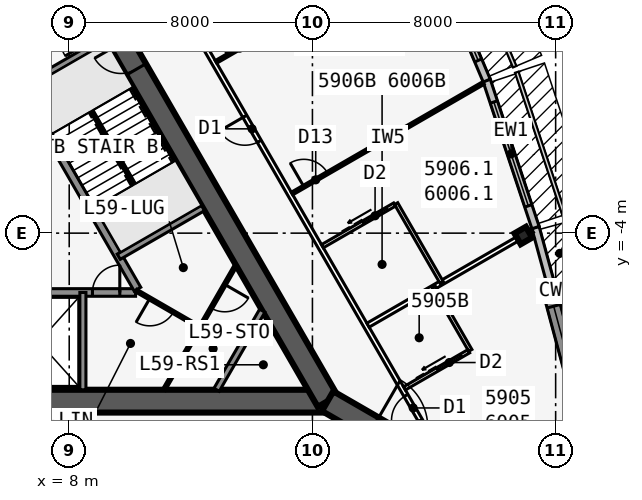
"""IFC4 building model, lengths in metres.
Left out: names, types, materials, properties, quantities, classifications, styles, units other than length and angle.
Written with IfcOpenShell. Run it as: python <this file> out.ifc"""

import sys

from ifc_helpers import new_model, si_unit, direction, frame, frame_2d, origin, origin_2d, place, context, subcontext, project, spatial, polyline, rectangle, i_section, outline, extrude, element, fill, save


model = new_model("IFC4")
c1 = context("Model", 3, precision=1e-05, world=origin(), true_north=direction((0.0, 1.0)))
c2 = subcontext(c1, "Body", "Model", "MODEL_VIEW")
j1 = project(units=[si_unit("LENGTHUNIT", "METRE"), si_unit("PLANEANGLEUNIT", "RADIAN")], contexts=[c1])
p1 = place(None, origin())
s1 = spatial("IfcSite", under=j1, at=p1, CompositionType="ELEMENT")
p2 = place(p1, origin())
s2 = spatial("IfcBuilding", under=s1, at=p2, CompositionType="ELEMENT")
p3 = place(p2, frame((0.0, 0.0, 222.5)))
s3 = spatial("IfcBuildingStorey", under=s2, at=p3, CompositionType="ELEMENT", Elevation=222.5)
p4 = place(p3, frame((-16.5, -9.526, 0.0), z_axis=(0.0, 0.0, 1.0), x_axis=(1.0, 0.0, 0.0)))
e1 = element("IfcWall", 1, at=p4, inside=s3, PredefinedType="SHEAR", context=c2, shape_type="SweptSolid", body=[
    extrude(rectangle(XDim=33.0, YDim=0.75, at=frame_2d((16.5, 0.0))), origin(), (0.0, 0.0, 1.0), 3.6),
])
p5 = place(p4, frame((14.05, 0.0, 0.0)))
e2 = element("IfcOpeningElement", 2, at=p5, cuts=e1, PredefinedType="OPENING", context=c2, shape_type="SweptSolid", body=[
    extrude(rectangle(XDim=1.8, YDim=2.13, at=frame_2d((0.9, 1.065))), frame((0.0, 0.385, 0.0), z_axis=(0.0, -1.0, 0.0), x_axis=(1.0, 0.0, 0.0)), (0.0, 0.0, 1.0), 0.77),
])
p6 = place(p3, frame((-0.55, -5.951, 0.0), z_axis=(0.0, 0.0, 1.0), x_axis=(1.0, 0.0, 0.0)))
e3 = element("IfcWall", 3, at=p6, inside=s3, PredefinedType="SOLIDWALL", context=c2, shape_type="SweptSolid", body=[
    extrude(rectangle(XDim=10.733, YDim=0.25, at=frame_2d((5.366, 0.0))), origin(), (0.0, 0.0, 1.0), 3.435),
])
p7 = place(p6, frame((9.314, 0.0, 0.0)))
e4 = element("IfcOpeningElement", 4, at=p7, cuts=e3, PredefinedType="OPENING", context=c2, shape_type="SweptSolid", body=[
    extrude(rectangle(XDim=0.9, YDim=2.13, at=frame_2d((0.45, 1.065))), frame((0.0, 0.135, 0.0), z_axis=(0.0, -1.0, 0.0), x_axis=(1.0, 0.0, 0.0)), (0.0, 0.0, 1.0), 0.27),
])
p8 = place(p6, frame((1.05, 0.0, 0.0)))
e5 = element("IfcOpeningElement", 5, at=p8, cuts=e3, PredefinedType="OPENING", context=c2, shape_type="SweptSolid", body=[
    extrude(rectangle(XDim=1.1, YDim=2.13, at=frame_2d((0.55, 1.065))), frame((0.0, 0.135, 0.0), z_axis=(0.0, -1.0, 0.0), x_axis=(1.0, 0.0, 0.0)), (0.0, 0.0, 1.0), 0.27),
])
p9 = place(p6, frame((4.05, 0.0, 0.0)))
e6 = element("IfcOpeningElement", 6, at=p9, cuts=e3, PredefinedType="OPENING", context=c2, shape_type="SweptSolid", body=[
    extrude(rectangle(XDim=1.1, YDim=2.13, at=frame_2d((0.55, 1.065))), frame((0.0, 0.135, 0.0), z_axis=(0.0, -1.0, 0.0), x_axis=(1.0, 0.0, 0.0)), (0.0, 0.0, 1.0), 0.27),
])
p10 = place(p3, frame((8.45, -5.951, 0.0), z_axis=(0.0, 0.0, 1.0), x_axis=(0.0, -1.0, 0.0)))
e7 = element("IfcWall", 7, at=p10, inside=s3, PredefinedType="SOLIDWALL", context=c2, shape_type="SweptSolid", body=[
    extrude(rectangle(XDim=3.2, YDim=0.2, at=frame_2d((1.6, 0.0))), origin(), (0.0, 0.0, 1.0), 3.435),
])
p11 = place(p3, frame((16.5, -9.526, 0.0), z_axis=(0.0, 0.0, 1.0), x_axis=(-0.499999749417, 0.866025548458, 0.0)))
e8 = element("IfcWall", 8, at=p11, inside=s3, PredefinedType="SHEAR", context=c2, shape_type="SweptSolid", body=[
    extrude(rectangle(XDim=33.0, YDim=0.75, at=frame_2d((16.5, 0.0))), origin(), (0.0, 0.0, 1.0), 3.6),
])
p12 = place(p11, frame((14.15, 0.0, 0.0)))
e9 = element("IfcOpeningElement", 9, at=p12, cuts=e8, PredefinedType="OPENING", context=c2, shape_type="SweptSolid", body=[
    extrude(rectangle(XDim=1.8, YDim=2.13, at=frame_2d((0.9, 1.065))), frame((0.0, 0.385, 0.0), z_axis=(0.0, -1.0, 0.0), x_axis=(1.0, 0.0, 0.0)), (0.0, 0.0, 1.0), 0.77),
])
p13 = place(p11, frame((12.6, 0.0, 0.0)))
e10 = element("IfcOpeningElement", 10, at=p13, cuts=e8, PredefinedType="OPENING", context=c2, shape_type="SweptSolid", body=[
    extrude(rectangle(XDim=1.0, YDim=2.13, at=frame_2d((0.5, 1.065))), frame((0.0, 0.385, 0.0), z_axis=(0.0, -1.0, 0.0), x_axis=(1.0, 0.0, 0.0)), (0.0, 0.0, 1.0), 0.77),
])
p14 = place(p3, frame((10.245, -5.843, 0.0), z_axis=(0.0, 0.0, 1.0), x_axis=(-0.499993009313, 0.866029439822, 0.0)))
e11 = element("IfcWall", 11, at=p14, inside=s3, PredefinedType="SOLIDWALL", context=c2, shape_type="SweptSolid", body=[
    extrude(rectangle(XDim=7.733, YDim=0.25, at=frame_2d((3.866, 0.0))), origin(), (0.0, 0.0, 1.0), 3.435),
])
for number, where, z_axis, x_axis in (
    (12, (9.629, -4.775, 0.0), (0.0, 0.0, 1.0), (0.866, 0.5, 0.0)),
    (13, (6.429, 0.767, 0.0), (0.0, 0.0, 1.0), (0.866, 0.5, 0.0)),
):
    element("IfcWall", number, at=place(p3, frame(where, z_axis=z_axis, x_axis=x_axis)), inside=s3, PredefinedType="SOLIDWALL", context=c2, shape_type="SweptSolid", body=[
        extrude(rectangle(XDim=3.2, YDim=0.2, at=frame_2d((1.6, 0.0))), origin(), (0.0, 0.0, 1.0), 3.435),
    ])
p15 = place(p3, frame((16.5, -9.526, 0.0), z_axis=(0.0, 0.0, 1.0), x_axis=(0.866031398331, -0.499989616998, 0.0)))
e14 = element("IfcWall", 14, at=p15, inside=s3, PredefinedType="SHEAR", context=c2, shape_type="SweptSolid", body=[
    extrude(rectangle(XDim=4.746, YDim=0.75, at=frame_2d((2.373, 0.0))), origin(), (0.0, 0.0, 1.0), 3.6),
])
p16 = place(p15, frame((1.725, 0.0, 0.0)))
e15 = element("IfcOpeningElement", 15, at=p16, cuts=e14, PredefinedType="OPENING", context=c2, shape_type="SweptSolid", body=[
    extrude(rectangle(XDim=1.8, YDim=2.13, at=frame_2d((0.9, 1.065))), frame((0.0, 0.385, 0.0), z_axis=(0.0, -1.0, 0.0), x_axis=(1.0, 0.0, 0.0)), (0.0, 0.0, 1.0), 0.77),
])
p17 = place(p3, frame((22.937, -4.078, 0.0), z_axis=(0.0, 0.0, 1.0), x_axis=(-0.5, 0.866025403784, 0.0)))
e16 = element("IfcColumn", 16, at=p17, inside=s3, PredefinedType="COLUMN", context=c2, shape_type="SweptSolid", body=[
    extrude(i_section(OverallWidth=0.411, OverallDepth=0.434, WebThickness=0.036, FlangeThickness=0.057, at=origin_2d()), origin(), (0.0, 0.0, 1.0), 3.6),
])
p18 = place(p3, frame((23.783, -13.798, 0.0), z_axis=(0.0, 0.0, 1.0), x_axis=(0.258799282522, 0.96593112144, 0.0)))
e17 = element("IfcWall", 17, at=p18, inside=s3, PredefinedType="SOLIDWALL", context=c2, shape_type="SweptSolid", body=[
    extrude(outline(polyline([(4.184, 0.225), (0.509, 0.225), (0.479, 0.113), (0.059, 0.225), (0.0, 0.225), (0.0, -0.225), (4.184, -0.225), (4.184, 0.225)])), origin(), (0.0, 0.0, 1.0), 3.435),
])
p19 = place(p18, frame((1.071, 0.0, 0.45)))
e18 = element("IfcOpeningElement", 18, at=p19, cuts=e17, PredefinedType="OPENING", context=c2, shape_type="SweptSolid", body=[
    extrude(rectangle(XDim=2.4, YDim=2.6, at=frame_2d((1.2, 1.3))), frame((0.0, 0.235, 0.0), z_axis=(0.0, -1.0, 0.0), x_axis=(1.0, 0.0, 0.0)), (0.0, 0.0, 1.0), 0.47),
])
p20 = place(p3, frame((24.865, -9.873, 0.0), z_axis=(0.0, 0.0, 1.0), x_axis=(-0.258784695888, 0.965935029479, 0.0)))
e19 = element("IfcWall", 19, at=p20, inside=s3, PredefinedType="SOLIDWALL", context=c2, shape_type="SweptSolid", body=[
    extrude(rectangle(XDim=4.184, YDim=0.45, at=frame_2d((2.092, 0.0))), origin(), (0.0, 0.0, 1.0), 3.435),
])
p21 = place(p20, frame((0.592, 0.0, 0.45)))
e20 = element("IfcOpeningElement", 20, at=p21, cuts=e19, PredefinedType="OPENING", context=c2, shape_type="SweptSolid", body=[
    extrude(rectangle(XDim=3.0, YDim=2.6, at=frame_2d((1.5, 1.3))), frame((0.0, 0.235, 0.0), z_axis=(0.0, -1.0, 0.0), x_axis=(1.0, 0.0, 0.0)), (0.0, 0.0, 1.0), 0.47),
])
p22 = place(p3, frame((23.879, -5.806, 0.0), z_axis=(0.0, 0.0, 1.0), x_axis=(-0.262867703986, 0.964831887015, 0.0)))
e21 = element("IfcWall", 21, at=p22, inside=s3, PredefinedType="STANDARD", context=c2, shape_type="SweptSolid", body=[
    extrude(rectangle(XDim=2.068, YDim=0.25, at=frame_2d((1.034, 0.0))), origin(), (0.0, 0.0, 1.0), 3.435),
])
p23 = place(p3, frame((23.338, -3.817, 0.0), z_axis=(0.0, 0.0, 1.0), x_axis=(-0.315108478109, 0.949055660656, 0.0)))
e22 = element("IfcWall", 22, at=p23, inside=s3, PredefinedType="STANDARD", context=c2, shape_type="SweptSolid", body=[
    extrude(rectangle(XDim=5.105, YDim=0.25, at=frame_2d((2.552, 0.0))), origin(), (0.0, 0.0, 1.0), 3.435),
])
p24 = place(p23, frame((0.752, 0.0, 0.45)))
e23 = element("IfcOpeningElement", 23, at=p24, cuts=e22, PredefinedType="OPENING", context=c2, shape_type="SweptSolid", body=[
    extrude(rectangle(XDim=3.6, YDim=2.6, at=frame_2d((1.8, 1.3))), frame((0.0, 0.135, 0.0), z_axis=(0.0, -1.0, 0.0), x_axis=(1.0, 0.0, 0.0)), (0.0, 0.0, 1.0), 0.27),
])
p25 = place(p3, frame((21.733, 1.018, 0.0), z_axis=(0.0, 0.0, 1.0), x_axis=(-0.390096809471, 0.920773848044, 0.0)))
e24 = element("IfcWall", 24, at=p25, inside=s3, PredefinedType="STANDARD", context=c2, shape_type="SweptSolid", body=[
    extrude(rectangle(XDim=5.038, YDim=0.25, at=frame_2d((2.519, 0.0))), origin(), (0.0, 0.0, 1.0), 3.435),
])
p26 = place(p25, frame((0.719, 0.0, 0.45)))
e25 = element("IfcOpeningElement", 25, at=p26, cuts=e24, PredefinedType="OPENING", context=c2, shape_type="SweptSolid", body=[
    extrude(rectangle(XDim=3.6, YDim=2.6, at=frame_2d((1.8, 1.3))), frame((0.0, 0.135, 0.0), z_axis=(0.0, -1.0, 0.0), x_axis=(1.0, 0.0, 0.0)), (0.0, 0.0, 1.0), 0.27),
])
p27 = place(p3, frame((20.102, -11.115, 0.0), z_axis=(0.0, 0.0, 1.0), x_axis=(-0.500000265775, 0.866025250339, 0.0)))
e26 = element("IfcWall", 26, at=p27, inside=s3, PredefinedType="PARTITIONING", context=c2, shape_type="SweptSolid", body=[
    extrude(rectangle(XDim=39.354, YDim=0.15, at=frame_2d((19.677, 0.0))), origin(), (0.0, 0.0, 1.0), 3.435),
])
p28 = place(p27, frame((1.102, 0.0, 0.0)))
e27 = element("IfcOpeningElement", 27, at=p28, cuts=e26, PredefinedType="OPENING", context=c2, shape_type="SweptSolid", body=[
    extrude(rectangle(XDim=0.95, YDim=2.13, at=frame_2d((0.475, 1.065))), frame((0.0, 0.085, 0.0), z_axis=(0.0, -1.0, 0.0), x_axis=(1.0, 0.0, 0.0)), (0.0, 0.0, 1.0), 0.17),
])
p29 = place(p27, frame((11.702, 0.0, 0.0)))
e28 = element("IfcOpeningElement", 28, at=p29, cuts=e26, PredefinedType="OPENING", context=c2, shape_type="SweptSolid", body=[
    extrude(rectangle(XDim=0.95, YDim=2.13, at=frame_2d((0.475, 1.065))), frame((0.0, 0.085, 0.0), z_axis=(0.0, -1.0, 0.0), x_axis=(1.0, 0.0, 0.0)), (0.0, 0.0, 1.0), 0.17),
])
p30 = place(p27, frame((26.702, 0.0, 0.0)))
e29 = element("IfcOpeningElement", 29, at=p30, cuts=e26, PredefinedType="OPENING", context=c2, shape_type="SweptSolid", body=[
    extrude(rectangle(XDim=0.95, YDim=2.13, at=frame_2d((0.475, 1.065))), frame((0.0, 0.085, 0.0), z_axis=(0.0, -1.0, 0.0), x_axis=(1.0, 0.0, 0.0)), (0.0, 0.0, 1.0), 0.17),
])
p31 = place(p27, frame((37.302, 0.0, 0.0)))
e30 = element("IfcOpeningElement", 30, at=p31, cuts=e26, PredefinedType="OPENING", context=c2, shape_type="SweptSolid", body=[
    extrude(rectangle(XDim=0.95, YDim=2.13, at=frame_2d((0.475, 1.065))), frame((0.0, 0.085, 0.0), z_axis=(0.0, -1.0, 0.0), x_axis=(1.0, 0.0, 0.0)), (0.0, 0.0, 1.0), 0.17),
])
p32 = place(p3, frame((17.829, -7.027, 0.0), z_axis=(0.0, 0.0, 1.0), x_axis=(0.866026604282, 0.499997920671, 0.0)))
e31 = element("IfcWall", 31, at=p32, inside=s3, PredefinedType="PARTITIONING", context=c2, shape_type="SweptSolid", body=[
    extrude(rectangle(XDim=6.24, YDim=0.15, at=frame_2d((3.12, 0.0))), origin(), (0.0, 0.0, 1.0), 2.589),
])
p33 = place(p3, frame((15.329, -2.697, 0.0), z_axis=(0.0, 0.0, 1.0), x_axis=(0.866032413668, 0.499987858329, 0.0)))
e32 = element("IfcWall", 32, at=p33, inside=s3, PredefinedType="PARTITIONING", context=c2, shape_type="SweptSolid", body=[
    extrude(rectangle(XDim=7.273, YDim=0.1, at=frame_2d((3.636, 0.0))), origin(), (0.0, 0.0, 1.0), 2.589),
])
p34 = place(p33, frame((0.45, 0.0, 0.0)))
e33 = element("IfcOpeningElement", 33, at=p34, cuts=e32, PredefinedType="OPENING", context=c2, shape_type="SweptSolid", body=[
    extrude(rectangle(XDim=0.9, YDim=2.13, at=frame_2d((0.45, 1.065))), frame((0.0, 0.06, 0.0), z_axis=(0.0, -1.0, 0.0), x_axis=(1.0, 0.0, 0.0)), (0.0, 0.0, 1.0), 0.12),
])
p35 = place(p3, frame((12.829, 1.633, 0.0), z_axis=(0.0, 0.0, 1.0), x_axis=(0.866030558329, 0.49999107196, 0.0)))
e34 = element("IfcWall", 34, at=p35, inside=s3, PredefinedType="PARTITIONING", context=c2, shape_type="SweptSolid", body=[
    extrude(rectangle(XDim=7.894, YDim=0.1, at=frame_2d((3.947, 0.0))), origin(), (0.0, 0.0, 1.0), 2.589),
])
p36 = place(p35, frame((0.45, 0.0, 0.0)))
e35 = element("IfcOpeningElement", 35, at=p36, cuts=e34, PredefinedType="OPENING", context=c2, shape_type="SweptSolid", body=[
    extrude(rectangle(XDim=0.9, YDim=2.13, at=frame_2d((0.45, 1.065))), frame((0.0, 0.06, 0.0), z_axis=(0.0, -1.0, 0.0), x_axis=(1.0, 0.0, 0.0)), (0.0, 0.0, 1.0), 0.12),
])
p37 = place(p3, frame((21.194, -7.856, 0.0), z_axis=(0.0, 0.0, 1.0), x_axis=(-0.500033551112, 0.866006032174, 0.0)))
e36 = element("IfcWall", 36, at=p37, inside=s3, PredefinedType="PLUMBINGWALL", context=c2, shape_type="SweptSolid", body=[
    extrude(rectangle(XDim=2.4, YDim=0.12, at=frame_2d((1.2, 0.0))), origin(), (0.0, 0.0, 1.0), 3.435),
])
p38 = place(p3, frame((19.029, -9.106, 0.0), z_axis=(0.0, 0.0, 1.0), x_axis=(0.866023955769, 0.500002508028, 0.0)))
e37 = element("IfcWall", 37, at=p38, inside=s3, PredefinedType="PLUMBINGWALL", context=c2, shape_type="SweptSolid", body=[
    extrude(rectangle(XDim=2.44, YDim=0.12, at=frame_2d((1.22, 0.0))), origin(), (0.0, 0.0, 1.0), 3.435),
])
p39 = place(p38, frame((1.25, 0.0, 0.0)))
e38 = element("IfcOpeningElement", 38, at=p39, cuts=e37, PredefinedType="OPENING", context=c2, shape_type="SweptSolid", body=[
    extrude(rectangle(XDim=0.9, YDim=2.13, at=frame_2d((0.45, 1.065))), frame((0.0, 0.07, 0.0), z_axis=(0.0, -1.0, 0.0), x_axis=(1.0, 0.0, 0.0)), (0.0, 0.0, 1.0), 0.14),
])
p40 = place(p3, frame((20.253, -5.627, 0.0), z_axis=(0.0, 0.0, 1.0), x_axis=(-0.50002537861, 0.866010750942, 0.0)))
e39 = element("IfcWall", 39, at=p40, inside=s3, PredefinedType="PLUMBINGWALL", context=c2, shape_type="SweptSolid", body=[
    extrude(rectangle(XDim=3.0, YDim=0.12, at=frame_2d((1.5, 0.0))), origin(), (0.0, 0.0, 1.0), 3.435),
])
p41 = place(p3, frame((16.329, -4.429, 0.0), z_axis=(0.0, 0.0, 1.0), x_axis=(0.865997131366, 0.500048966069, 0.0)))
e40 = element("IfcWall", 40, at=p41, inside=s3, PredefinedType="PLUMBINGWALL", context=c2, shape_type="SweptSolid", body=[
    extrude(rectangle(XDim=2.74, YDim=0.12, at=frame_2d((1.37, 0.0))), origin(), (0.0, 0.0, 1.0), 3.435),
])
p42 = place(p41, frame((1.55, 0.0, 0.0)))
e41 = element("IfcOpeningElement", 41, at=p42, cuts=e40, PredefinedType="OPENING", context=c2, shape_type="SweptSolid", body=[
    extrude(rectangle(XDim=0.9, YDim=2.13, at=frame_2d((0.45, 1.065))), frame((0.0, 0.07, 0.0), z_axis=(0.0, -1.0, 0.0), x_axis=(1.0, 0.0, 0.0)), (0.0, 0.0, 1.0), 0.14),
])
p43 = place(p3, frame((14.349, -6.551, 0.0), z_axis=(0.0, 0.0, 1.0), x_axis=(-0.499952404951, -0.866052881055, 0.0)))
e42 = element("IfcWall", 42, at=p43, inside=s3, PredefinedType="SOLIDWALL", context=c2, shape_type="SweptSolid", body=[
    extrude(rectangle(XDim=3.002, YDim=0.2, at=frame_2d((1.501, 0.0))), origin(), (0.0, 0.0, 1.0), 3.435),
])
p44 = place(p3, frame((13.483, -5.051, 0.0), z_axis=(0.0, 0.0, 1.0), x_axis=(-0.499999210213, -0.866025859768, 0.0)))
e43 = element("IfcWall", 43, at=p44, inside=s3, PredefinedType="PARTITIONING", context=c2, shape_type="SweptSolid", body=[
    extrude(rectangle(XDim=4.734, YDim=0.1, at=frame_2d((2.367, 0.0))), origin(), (0.0, 0.0, 1.0), 3.435),
])
p45 = place(p44, frame((0.734, 0.0, 0.0)))
e44 = element("IfcOpeningElement", 44, at=p45, cuts=e43, PredefinedType="OPENING", context=c2, shape_type="SweptSolid", body=[
    extrude(rectangle(XDim=0.9, YDim=2.13, at=frame_2d((0.45, 1.065))), frame((0.0, 0.06, 0.0), z_axis=(0.0, -1.0, 0.0), x_axis=(1.0, 0.0, 0.0)), (0.0, 0.0, 1.0), 0.12),
])
p46 = place(p3, frame((12.3, -7.101, 0.0), z_axis=(0.0, 0.0, 1.0), x_axis=(-0.866022978719, 0.500004200313, 0.0)))
e45 = element("IfcWall", 45, at=p46, inside=s3, PredefinedType="PARTITIONING", context=c2, shape_type="SweptSolid", body=[
    extrude(rectangle(XDim=2.425, YDim=0.1, at=frame_2d((1.213, 0.0))), origin(), (0.0, 0.0, 1.0), 3.435),
])
p47 = place(p46, frame((1.005, 0.0, 0.0)))
e46 = element("IfcOpeningElement", 46, at=p47, cuts=e45, PredefinedType="OPENING", context=c2, shape_type="SweptSolid", body=[
    extrude(rectangle(XDim=0.9, YDim=2.13, at=frame_2d((0.45, 1.065))), frame((0.0, 0.06, 0.0), z_axis=(0.0, -1.0, 0.0), x_axis=(1.0, 0.0, 0.0)), (0.0, 0.0, 1.0), 0.12),
])
p48 = place(p3, frame((10.135, -2.401, 0.0), z_axis=(0.0, 0.0, 1.0), x_axis=(-0.499992232847, 0.866029888106, 0.0)))
e47 = element("IfcWall", 47, at=p48, inside=s3, PredefinedType="SOLIDWALL", context=c2, shape_type="SweptSolid", body=[
    extrude(rectangle(XDim=2.794, YDim=0.1, at=frame_2d((1.397, 0.0))), origin(), (0.0, 0.0, 1.0), 3.6),
])
p49 = place(p21, origin())
e48 = element("IfcWindow", 48, at=p49, inside=s3, PartitioningType="SINGLE_PANEL", PredefinedType="WINDOW", context=c2, shape_type="SweptSolid", body=[
    extrude(rectangle(XDim=3.0, YDim=2.6, at=frame_2d((1.5, 1.3))), frame((0.0, 0.03, 0.0), z_axis=(0.0, -1.0, 0.0), x_axis=(1.0, 0.0, 0.0)), (0.0, 0.0, 1.0), 0.06),
])
fill(e20, e48)
p50 = place(p24, origin())
e49 = element("IfcWindow", 49, at=p50, inside=s3, PartitioningType="SINGLE_PANEL", PredefinedType="WINDOW", context=c2, shape_type="SweptSolid", body=[
    extrude(rectangle(XDim=3.6, YDim=2.6, at=frame_2d((1.8, 1.3))), frame((0.0, 0.03, 0.0), z_axis=(0.0, -1.0, 0.0), x_axis=(1.0, 0.0, 0.0)), (0.0, 0.0, 1.0), 0.06),
])
fill(e23, e49)
p51 = place(p26, origin())
e50 = element("IfcWindow", 50, at=p51, inside=s3, PartitioningType="SINGLE_PANEL", PredefinedType="WINDOW", context=c2, shape_type="SweptSolid", body=[
    extrude(rectangle(XDim=3.6, YDim=2.6, at=frame_2d((1.8, 1.3))), frame((0.0, 0.03, 0.0), z_axis=(0.0, -1.0, 0.0), x_axis=(1.0, 0.0, 0.0)), (0.0, 0.0, 1.0), 0.06),
])
fill(e25, e50)
p52 = place(p34, origin())
e51 = element("IfcDoor", 51, at=p52, inside=s3, OperationType="SINGLE_SWING_LEFT", PredefinedType="DOOR", context=c2, shape_type="SweptSolid", body=[
    extrude(rectangle(XDim=0.9, YDim=2.13, at=frame_2d((0.45, 1.065))), frame((0.0, 0.025, 0.0), z_axis=(0.0, -1.0, 0.0), x_axis=(1.0, 0.0, 0.0)), (0.0, 0.0, 1.0), 0.05),
])
fill(e33, e51)
p53 = place(p36, origin())
e52 = element("IfcDoor", 52, at=p53, inside=s3, OperationType="SINGLE_SWING_LEFT", PredefinedType="DOOR", context=c2, shape_type="SweptSolid", body=[
    extrude(rectangle(XDim=0.9, YDim=2.13, at=frame_2d((0.45, 1.065))), frame((0.0, 0.025, 0.0), z_axis=(0.0, -1.0, 0.0), x_axis=(1.0, 0.0, 0.0)), (0.0, 0.0, 1.0), 0.05),
])
fill(e35, e52)
p54 = place(p39, origin())
e53 = element("IfcDoor", 53, at=p54, inside=s3, OperationType="SLIDING_TO_LEFT", PredefinedType="DOOR", context=c2, shape_type="SweptSolid", body=[
    extrude(rectangle(XDim=0.9, YDim=2.13, at=frame_2d((0.45, 1.065))), frame((0.0, 0.025, 0.0), z_axis=(0.0, -1.0, 0.0), x_axis=(1.0, 0.0, 0.0)), (0.0, 0.0, 1.0), 0.05),
])
fill(e38, e53)
p55 = place(p28, origin())
e54 = element("IfcDoor", 54, at=p55, inside=s3, OperationType="SINGLE_SWING_LEFT", PredefinedType="DOOR", context=c2, shape_type="SweptSolid", body=[
    extrude(rectangle(XDim=0.95, YDim=2.13, at=frame_2d((0.475, 1.065))), frame((0.0, 0.025, 0.0), z_axis=(0.0, -1.0, 0.0), x_axis=(1.0, 0.0, 0.0)), (0.0, 0.0, 1.0), 0.05),
])
fill(e27, e54)
p56 = place(p42, origin())
e55 = element("IfcDoor", 55, at=p56, inside=s3, OperationType="SLIDING_TO_LEFT", PredefinedType="DOOR", context=c2, shape_type="SweptSolid", body=[
    extrude(rectangle(XDim=0.9, YDim=2.13, at=frame_2d((0.45, 1.065))), frame((0.0, 0.025, 0.0), z_axis=(0.0, -1.0, 0.0), x_axis=(1.0, 0.0, 0.0)), (0.0, 0.0, 1.0), 0.05),
])
fill(e41, e55)
p57 = place(p29, origin())
e56 = element("IfcDoor", 56, at=p57, inside=s3, OperationType="SINGLE_SWING_RIGHT", PredefinedType="DOOR", context=c2, shape_type="SweptSolid", body=[
    extrude(rectangle(XDim=0.95, YDim=2.13, at=frame_2d((0.475, 1.065))), frame((0.0, 0.025, 0.0), z_axis=(0.0, -1.0, 0.0), x_axis=(1.0, 0.0, 0.0)), (0.0, 0.0, 1.0), 0.05),
])
fill(e28, e56)
p58 = place(p13, origin())
e57 = element("IfcDoor", 57, at=p58, inside=s3, OperationType="SINGLE_SWING_RIGHT", PredefinedType="DOOR", context=c2, shape_type="SweptSolid", body=[
    extrude(rectangle(XDim=1.0, YDim=2.13, at=frame_2d((0.5, 1.065))), frame((0.0, 0.025, 0.0), z_axis=(0.0, -1.0, 0.0), x_axis=(1.0, 0.0, 0.0)), (0.0, 0.0, 1.0), 0.05),
])
fill(e10, e57)
p59 = place(p45, origin())
e58 = element("IfcDoor", 58, at=p59, inside=s3, OperationType="SINGLE_SWING_LEFT", PredefinedType="DOOR", context=c2, shape_type="SweptSolid", body=[
    extrude(rectangle(XDim=0.9, YDim=2.13, at=frame_2d((0.45, 1.065))), frame((0.0, 0.025, 0.0), z_axis=(0.0, -1.0, 0.0), x_axis=(1.0, 0.0, 0.0)), (0.0, 0.0, 1.0), 0.05),
])
fill(e44, e58)
p60 = place(p7, origin())
e59 = element("IfcDoor", 59, at=p60, inside=s3, OperationType="SINGLE_SWING_RIGHT", PredefinedType="DOOR", context=c2, shape_type="SweptSolid", body=[
    extrude(rectangle(XDim=0.9, YDim=2.13, at=frame_2d((0.45, 1.065))), frame((0.0, 0.025, 0.0), z_axis=(0.0, -1.0, 0.0), x_axis=(1.0, 0.0, 0.0)), (0.0, 0.0, 1.0), 0.05),
])
fill(e4, e59)
p61 = place(p47, origin())
e60 = element("IfcDoor", 60, at=p61, inside=s3, OperationType="SINGLE_SWING_RIGHT", PredefinedType="DOOR", context=c2, shape_type="SweptSolid", body=[
    extrude(rectangle(XDim=0.9, YDim=2.13, at=frame_2d((0.45, 1.065))), frame((0.0, 0.025, 0.0), z_axis=(0.0, -1.0, 0.0), x_axis=(1.0, 0.0, 0.0)), (0.0, 0.0, 1.0), 0.05),
])
fill(e46, e60)
save(model, sys.argv[1])
